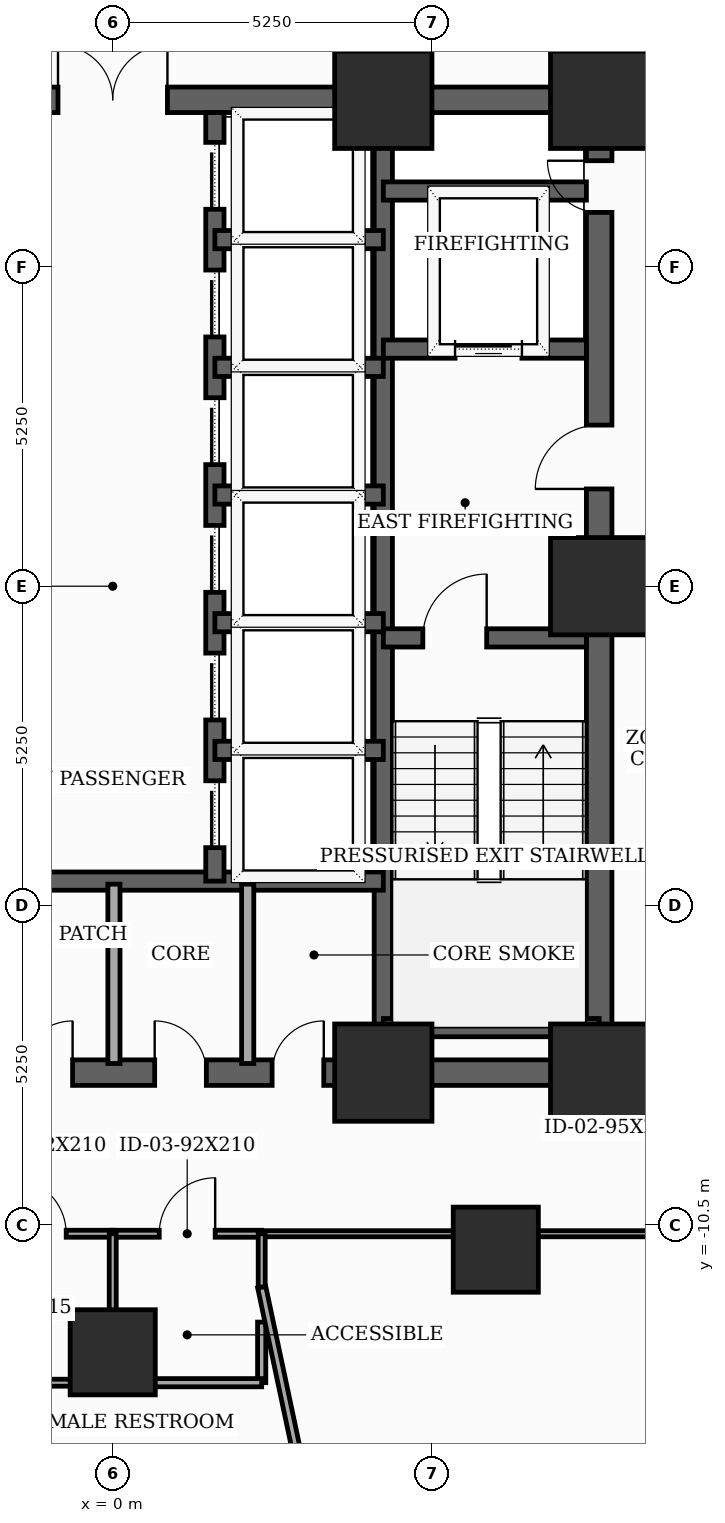
"""IFC4 building model, lengths in metres.
Left out: names, types, materials, properties, quantities, classifications, styles, units other than length and angle.
Written with IfcOpenShell. Run it as: python <this file> out.ifc"""

import sys

from ifc_helpers import new_model, si_unit, direction, frame, frame_2d, origin, origin_2d, place, context, subcontext, project, spatial, rectangle, extrude, element, fill, save


model = new_model("IFC4")
c1 = context("Model", 3, precision=1e-05, world=origin(), true_north=direction((0.0, 1.0)))
c2 = subcontext(c1, "Body", "Model", "MODEL_VIEW")
j1 = project(units=[si_unit("LENGTHUNIT", "METRE"), si_unit("PLANEANGLEUNIT", "RADIAN")], contexts=[c1])
p1 = place(None, origin())
s1 = spatial("IfcSite", under=j1, at=p1, CompositionType="ELEMENT")
p2 = place(p1, origin())
s2 = spatial("IfcBuilding", under=s1, at=p2, CompositionType="ELEMENT")
p3 = place(p2, frame((0.0, 0.0, 51.9)))
s3 = spatial("IfcBuildingStorey", under=s2, at=p3, CompositionType="ELEMENT", Elevation=51.9)
for number, where, z_axis, x_axis in (
    (1, (4.45, -8.0, 0.0), (0.0, 0.0, 1.0), (1.0, 0.0, 0.0)),
    (2, (8.0, -8.0, 0.0), (0.0, 0.0, 1.0), (1.0, 0.0, 0.0)),
    (3, (8.0, 0.0, 0.0), (0.0, 0.0, 1.0), (1.0, 0.0, 0.0)),
    (4, (8.0, 8.0, 0.0), (0.0, 0.0, 1.0), (1.0, 0.0, 0.0)),
    (5, (4.45, 8.0, 0.0), (0.0, 0.0, 1.0), (1.0, 0.0, 0.0)),
):
    element("IfcColumn", number, at=place(p3, frame(where, z_axis=z_axis, x_axis=x_axis)), inside=s3, PredefinedType="COLUMN", context=c2, shape_type="SweptSolid", body=[
        extrude(rectangle(XDim=1.6, YDim=1.6, at=origin_2d()), origin(), (0.0, 0.0, 1.0), 3.7),
    ])
for number, where, z_axis, x_axis in (
    (6, (0.0, -12.6, 0.0), (0.0, 0.0, 1.0), (1.0, 0.0, 0.0)),
    (7, (6.3, -10.912, 0.0), (0.0, 0.0, 1.0), (1.0, 0.0, 0.0)),
):
    element("IfcColumn", number, at=place(p3, frame(where, z_axis=z_axis, x_axis=x_axis)), inside=s3, PredefinedType="COLUMN", context=c2, shape_type="SweptSolid", body=[
        extrude(rectangle(XDim=1.4, YDim=1.4, at=origin_2d()), origin(), (0.0, 0.0, 1.0), 3.7),
    ])
p4 = place(p3, frame((8.0, -8.0, 0.0), z_axis=(0.0, 0.0, 1.0), x_axis=(0.0, 1.0, 0.0)))
e8 = element("IfcWall", 8, at=p4, inside=s3, PredefinedType="SHEAR", context=c2, shape_type="SweptSolid", body=[
    extrude(rectangle(XDim=16.0, YDim=0.42, at=frame_2d((8.0, 0.0))), origin(), (0.0, 0.0, 1.0), 3.5),
])
p5 = place(p4, frame((9.6, 0.0, 0.0)))
e9 = element("IfcOpeningElement", 9, at=p5, cuts=e8, PredefinedType="OPENING", context=c2, shape_type="SweptSolid", body=[
    extrude(rectangle(XDim=1.05, YDim=2.15, at=frame_2d((0.525, 1.075))), frame((0.0, 0.22, 0.0), z_axis=(0.0, -1.0, 0.0), x_axis=(1.0, 0.0, 0.0)), (0.0, 0.0, 1.0), 0.44),
])
p6 = place(p4, frame((14.148, 0.0, 0.0)))
e10 = element("IfcOpeningElement", 10, at=p6, cuts=e8, PredefinedType="OPENING", context=c2, shape_type="SweptSolid", body=[
    extrude(rectangle(XDim=0.85, YDim=2.02, at=frame_2d((0.425, 1.01))), frame((0.0, 0.22, 0.0), z_axis=(0.0, -1.0, 0.0), x_axis=(1.0, 0.0, 0.0)), (0.0, 0.0, 1.0), 0.44),
])
p7 = place(p3, frame((-8.0, -8.0, 0.0), z_axis=(0.0, 0.0, 1.0), x_axis=(1.0, 0.0, 0.0)))
e11 = element("IfcWall", 11, at=p7, inside=s3, PredefinedType="SHEAR", context=c2, shape_type="SweptSolid", body=[
    extrude(rectangle(XDim=16.0, YDim=0.42, at=frame_2d((8.0, 0.0))), origin(), (0.0, 0.0, 1.0), 3.5),
])
p8 = place(p7, frame((4.529, 0.0, 0.0)))
e12 = element("IfcOpeningElement", 12, at=p8, cuts=e11, PredefinedType="OPENING", context=c2, shape_type="SweptSolid", body=[
    extrude(rectangle(XDim=0.85, YDim=2.02, at=frame_2d((0.425, 1.01))), frame((0.0, 0.22, 0.0), z_axis=(0.0, -1.0, 0.0), x_axis=(1.0, 0.0, 0.0)), (0.0, 0.0, 1.0), 0.44),
])
p9 = place(p7, frame((6.49, 0.0, 0.0)))
e13 = element("IfcOpeningElement", 13, at=p9, cuts=e11, PredefinedType="OPENING", context=c2, shape_type="SweptSolid", body=[
    extrude(rectangle(XDim=0.85, YDim=2.02, at=frame_2d((0.425, 1.01))), frame((0.0, 0.22, 0.0), z_axis=(0.0, -1.0, 0.0), x_axis=(1.0, 0.0, 0.0)), (0.0, 0.0, 1.0), 0.44),
])
p10 = place(p7, frame((8.69, 0.0, 0.0)))
e14 = element("IfcOpeningElement", 14, at=p10, cuts=e11, PredefinedType="OPENING", context=c2, shape_type="SweptSolid", body=[
    extrude(rectangle(XDim=0.85, YDim=2.02, at=frame_2d((0.425, 1.01))), frame((0.0, 0.22, 0.0), z_axis=(0.0, -1.0, 0.0), x_axis=(1.0, 0.0, 0.0)), (0.0, 0.0, 1.0), 0.44),
])
p11 = place(p7, frame((10.621, 0.0, 0.0)))
e15 = element("IfcOpeningElement", 15, at=p11, cuts=e11, PredefinedType="OPENING", context=c2, shape_type="SweptSolid", body=[
    extrude(rectangle(XDim=0.85, YDim=2.02, at=frame_2d((0.425, 1.01))), frame((0.0, 0.22, 0.0), z_axis=(0.0, -1.0, 0.0), x_axis=(1.0, 0.0, 0.0)), (0.0, 0.0, 1.0), 0.44),
])
p12 = place(p3, frame((-8.0, 8.0, 0.0), z_axis=(0.0, 0.0, 1.0), x_axis=(1.0, 0.0, 0.0)))
e16 = element("IfcWall", 16, at=p12, inside=s3, PredefinedType="SHEAR", context=c2, shape_type="SweptSolid", body=[
    extrude(rectangle(XDim=16.0, YDim=0.42, at=frame_2d((8.0, 0.0))), origin(), (0.0, 0.0, 1.0), 3.5),
])
p13 = place(p12, frame((7.1, 0.0, 0.0)))
e17 = element("IfcOpeningElement", 17, at=p13, cuts=e16, PredefinedType="OPENING", context=c2, shape_type="SweptSolid", body=[
    extrude(rectangle(XDim=1.8, YDim=2.15, at=frame_2d((0.9, 1.075))), frame((0.0, 0.22, 0.0), z_axis=(0.0, -1.0, 0.0), x_axis=(1.0, 0.0, 0.0)), (0.0, 0.0, 1.0), 0.44),
])
p14 = place(p3, frame((4.45, -7.79, 0.0), z_axis=(0.0, 0.0, 1.0), x_axis=(0.0, 1.0, 0.0)))
e18 = element("IfcWall", 18, at=p14, inside=s3, PredefinedType="SHEAR", context=c2, shape_type="SweptSolid", body=[
    extrude(rectangle(XDim=15.58, YDim=0.3, at=frame_2d((7.79, 0.0))), origin(), (0.0, 0.0, 1.0), 3.5),
])
p15 = place(p3, frame((4.45, -0.85, 0.0), z_axis=(0.0, 0.0, 1.0), x_axis=(1.0, 0.0, 0.0)))
e19 = element("IfcWall", 19, at=p15, inside=s3, PredefinedType="SHEAR", context=c2, shape_type="SweptSolid", body=[
    extrude(rectangle(XDim=3.34, YDim=0.3, at=frame_2d((1.67, 0.0))), origin(), (0.0, 0.0, 1.0), 3.5),
])
p16 = place(p15, frame((0.65, 0.0, 0.0)))
e20 = element("IfcOpeningElement", 20, at=p16, cuts=e19, PredefinedType="OPENING", context=c2, shape_type="SweptSolid", body=[
    extrude(rectangle(XDim=1.05, YDim=2.15, at=frame_2d((0.525, 1.075))), frame((0.0, 0.16, 0.0), z_axis=(0.0, -1.0, 0.0), x_axis=(1.0, 0.0, 0.0)), (0.0, 0.0, 1.0), 0.32),
])
p17 = place(p3, frame((4.45, -7.26, 0.0), z_axis=(0.0, 0.0, 1.0), x_axis=(1.0, 0.0, 0.0)))
e21 = element("IfcWall", 21, at=p17, inside=s3, PredefinedType="SHEAR", context=c2, shape_type="SweptSolid", body=[
    extrude(rectangle(XDim=3.55, YDim=0.3, at=frame_2d((1.775, 0.0))), origin(), (0.0, 0.0, 1.0), 3.5),
])
p18 = place(p3, frame((4.45, 3.9, 0.0), z_axis=(0.0, 0.0, 1.0), x_axis=(1.0, 0.0, 0.0)))
e22 = element("IfcWall", 22, at=p18, inside=s3, PredefinedType="SHEAR", context=c2, shape_type="SweptSolid", body=[
    extrude(rectangle(XDim=3.34, YDim=0.3, at=frame_2d((1.67, 0.0))), origin(), (0.0, 0.0, 1.0), 3.5),
])
p19 = place(p18, frame((1.18, 0.0, 0.0)))
e23 = element("IfcOpeningElement", 23, at=p19, cuts=e22, PredefinedType="OPENING", context=c2, shape_type="SweptSolid", body=[
    extrude(rectangle(XDim=1.1, YDim=2.1, at=frame_2d((0.55, 1.05))), frame((0.0, 0.16, 0.0), z_axis=(0.0, -1.0, 0.0), x_axis=(1.0, 0.0, 0.0)), (0.0, 0.0, 1.0), 0.32),
])
p20 = place(p3, frame((4.45, 6.5, 0.0), z_axis=(0.0, 0.0, 1.0), x_axis=(1.0, 0.0, 0.0)))
e24 = element("IfcWall", 24, at=p20, inside=s3, PredefinedType="SHEAR", context=c2, shape_type="SweptSolid", body=[
    extrude(rectangle(XDim=3.34, YDim=0.3, at=frame_2d((1.67, 0.0))), origin(), (0.0, 0.0, 1.0), 3.5),
])
p21 = place(p3, frame((-4.45, -4.85, 0.0), z_axis=(0.0, 0.0, 1.0), x_axis=(1.0, 0.0, 0.0)))
e25 = element("IfcWall", 25, at=p21, inside=s3, PredefinedType="SHEAR", context=c2, shape_type="SweptSolid", body=[
    extrude(rectangle(XDim=8.9, YDim=0.3, at=frame_2d((4.45, 0.0))), origin(), (0.0, 0.0, 1.0), 3.5),
])
p22 = place(p3, frame((1.68, -4.85, 0.0), z_axis=(0.0, 0.0, 1.0), x_axis=(0.0, 1.0, 0.0)))
e26 = element("IfcWall", 26, at=p22, inside=s3, PredefinedType="SHEAR", context=c2, shape_type="SweptSolid", body=[
    extrude(rectangle(XDim=12.64, YDim=0.3, at=frame_2d((6.32, 0.0))), origin(), (0.0, 0.0, 1.0), 3.5),
])
p23 = place(p22, frame((0.55, 0.0, 0.0)))
e27 = element("IfcOpeningElement", 27, at=p23, cuts=e26, PredefinedType="OPENING", context=c2, shape_type="SweptSolid", body=[
    extrude(rectangle(XDim=1.1, YDim=2.1, at=frame_2d((0.55, 1.05))), frame((0.0, 0.16, 0.0), z_axis=(0.0, -1.0, 0.0), x_axis=(1.0, 0.0, 0.0)), (0.0, 0.0, 1.0), 0.32),
])
p24 = place(p22, frame((2.65, 0.0, 0.0)))
e28 = element("IfcOpeningElement", 28, at=p24, cuts=e26, PredefinedType="OPENING", context=c2, shape_type="SweptSolid", body=[
    extrude(rectangle(XDim=1.1, YDim=2.1, at=frame_2d((0.55, 1.05))), frame((0.0, 0.16, 0.0), z_axis=(0.0, -1.0, 0.0), x_axis=(1.0, 0.0, 0.0)), (0.0, 0.0, 1.0), 0.32),
])
p25 = place(p22, frame((4.75, 0.0, 0.0)))
e29 = element("IfcOpeningElement", 29, at=p25, cuts=e26, PredefinedType="OPENING", context=c2, shape_type="SweptSolid", body=[
    extrude(rectangle(XDim=1.1, YDim=2.1, at=frame_2d((0.55, 1.05))), frame((0.0, 0.16, 0.0), z_axis=(0.0, -1.0, 0.0), x_axis=(1.0, 0.0, 0.0)), (0.0, 0.0, 1.0), 0.32),
])
p26 = place(p22, frame((6.85, 0.0, 0.0)))
e30 = element("IfcOpeningElement", 30, at=p26, cuts=e26, PredefinedType="OPENING", context=c2, shape_type="SweptSolid", body=[
    extrude(rectangle(XDim=1.1, YDim=2.1, at=frame_2d((0.55, 1.05))), frame((0.0, 0.16, 0.0), z_axis=(0.0, -1.0, 0.0), x_axis=(1.0, 0.0, 0.0)), (0.0, 0.0, 1.0), 0.32),
])
p27 = place(p22, frame((8.95, 0.0, 0.0)))
e31 = element("IfcOpeningElement", 31, at=p27, cuts=e26, PredefinedType="OPENING", context=c2, shape_type="SweptSolid", body=[
    extrude(rectangle(XDim=1.1, YDim=2.1, at=frame_2d((0.55, 1.05))), frame((0.0, 0.16, 0.0), z_axis=(0.0, -1.0, 0.0), x_axis=(1.0, 0.0, 0.0)), (0.0, 0.0, 1.0), 0.32),
])
p28 = place(p22, frame((11.05, 0.0, 0.0)))
e32 = element("IfcOpeningElement", 32, at=p28, cuts=e26, PredefinedType="OPENING", context=c2, shape_type="SweptSolid", body=[
    extrude(rectangle(XDim=1.1, YDim=2.1, at=frame_2d((0.55, 1.05))), frame((0.0, 0.16, 0.0), z_axis=(0.0, -1.0, 0.0), x_axis=(1.0, 0.0, 0.0)), (0.0, 0.0, 1.0), 0.32),
])
for number, where, z_axis, x_axis in (
    (33, (1.68, 1.5, 0.0), (0.0, 0.0, 1.0), (1.0, 0.0, 0.0)),
    (34, (1.68, 3.6, 0.0), (0.0, 0.0, 1.0), (1.0, 0.0, 0.0)),
    (35, (1.68, 5.7, 0.0), (0.0, 0.0, 1.0), (1.0, 0.0, 0.0)),
    (36, (1.68, -2.7, 0.0), (0.0, 0.0, 1.0), (1.0, 0.0, 0.0)),
    (37, (1.68, -0.6, 0.0), (0.0, 0.0, 1.0), (1.0, 0.0, 0.0)),
):
    element("IfcWall", number, at=place(p3, frame(where, z_axis=z_axis, x_axis=x_axis)), inside=s3, PredefinedType="SHEAR", context=c2, shape_type="SweptSolid", body=[
        extrude(rectangle(XDim=2.77, YDim=0.3, at=frame_2d((1.385, 0.0))), origin(), (0.0, 0.0, 1.0), 3.5),
    ])
for number, where, z_axis, x_axis in (
    (38, (0.02, -7.85, 0.0), (0.0, 0.0, 1.0), (0.0, 1.0, 0.0)),
    (39, (2.22, -7.85, 0.0), (0.0, 0.0, 1.0), (0.0, 1.0, 0.0)),
):
    element("IfcWall", number, at=place(p3, frame(where, z_axis=z_axis, x_axis=x_axis)), inside=s3, PredefinedType="SOLIDWALL", context=c2, shape_type="SweptSolid", body=[
        extrude(rectangle(XDim=2.95, YDim=0.2, at=frame_2d((1.475, 0.0))), origin(), (0.0, 0.0, 1.0), 2.885),
    ])
p29 = place(p3, frame((-2.45, -10.65, 0.0), z_axis=(0.0, 0.0, 1.0), x_axis=(1.0, 0.0, 0.0)))
e40 = element("IfcWall", 40, at=p29, inside=s3, PredefinedType="PARTITIONING", context=c2, shape_type="SweptSolid", body=[
    extrude(rectangle(XDim=2.45, YDim=0.115, at=frame_2d((1.225, 0.0))), origin(), (0.0, 0.0, 1.0), 2.785),
])
p30 = place(p29, frame((0.765, 0.0, 0.0)))
e41 = element("IfcOpeningElement", 41, at=p30, cuts=e40, PredefinedType="OPENING", context=c2, shape_type="SweptSolid", body=[
    extrude(rectangle(XDim=0.92, YDim=2.1, at=frame_2d((0.46, 1.05))), frame((0.0, 0.067, 0.0), z_axis=(0.0, -1.0, 0.0), x_axis=(1.0, 0.0, 0.0)), (0.0, 0.0, 1.0), 0.135),
])
p31 = place(p3, frame((0.0, -10.65, 0.0), z_axis=(0.0, 0.0, 1.0), x_axis=(1.0, 0.0, 0.0)))
e42 = element("IfcWall", 42, at=p31, inside=s3, PredefinedType="PARTITIONING", context=c2, shape_type="SweptSolid", body=[
    extrude(rectangle(XDim=2.45, YDim=0.115, at=frame_2d((1.225, 0.0))), origin(), (0.0, 0.0, 1.0), 3.5),
])
p32 = place(p31, frame((0.765, 0.0, 0.0)))
e43 = element("IfcOpeningElement", 43, at=p32, cuts=e42, PredefinedType="OPENING", context=c2, shape_type="SweptSolid", body=[
    extrude(rectangle(XDim=0.92, YDim=2.1, at=frame_2d((0.46, 1.05))), frame((0.0, 0.067, 0.0), z_axis=(0.0, -1.0, 0.0), x_axis=(1.0, 0.0, 0.0)), (0.0, 0.0, 1.0), 0.135),
])
p33 = place(p3, frame((2.45, -10.65, 0.0), z_axis=(0.0, 0.0, 1.0), x_axis=(1.0, 0.0, 0.0)))
e44 = element("IfcWall", 44, at=p33, inside=s3, PredefinedType="MOVABLE", context=c2, shape_type="SweptSolid", body=[
    extrude(rectangle(XDim=7.139, YDim=0.1, at=frame_2d((3.57, 0.0))), origin(), (0.0, 0.0, 1.0), 2.085),
])
p34 = place(p3, frame((-2.45, -13.1, 0.0), z_axis=(0.0, 0.0, 1.0), x_axis=(1.0, 0.0, 0.0)))
e45 = element("IfcWall", 45, at=p34, inside=s3, PredefinedType="PARTITIONING", context=c2, shape_type="SweptSolid", body=[
    extrude(rectangle(XDim=2.45, YDim=0.115, at=frame_2d((1.225, 0.0))), origin(), (0.0, 0.0, 1.0), 2.085),
])
p35 = place(p3, frame((0.0, -13.1, 0.0), z_axis=(0.0, 0.0, 1.0), x_axis=(0.0, 1.0, 0.0)))
e46 = element("IfcWall", 46, at=p35, inside=s3, PredefinedType="PARTITIONING", context=c2, shape_type="SweptSolid", body=[
    extrude(rectangle(XDim=2.45, YDim=0.115, at=frame_2d((1.225, 0.0))), origin(), (0.0, 0.0, 1.0), 2.085),
])
p36 = place(p3, frame((2.45, -12.103, 0.0), z_axis=(0.0, 0.0, 1.0), x_axis=(0.0, -1.0, 0.0)))
e47 = element("IfcWall", 47, at=p36, inside=s3, PredefinedType="PARTITIONING", context=c2, shape_type="SweptSolid", body=[
    extrude(rectangle(XDim=0.997, YDim=0.135, at=frame_2d((0.499, 0.0))), origin(), (0.0, 0.0, 1.0), 2.785),
])
p37 = place(p3, frame((2.45, -13.1, 0.0), z_axis=(0.0, 0.0, 1.0), x_axis=(-1.0, 0.0, 0.0)))
e48 = element("IfcWall", 48, at=p37, inside=s3, PredefinedType="PARTITIONING", context=c2, shape_type="SweptSolid", body=[
    extrude(rectangle(XDim=2.45, YDim=0.135, at=frame_2d((1.225, 0.0))), origin(), (0.0, 0.0, 1.0), 2.085),
])
p38 = place(p3, frame((3.52, -16.56, 0.0), z_axis=(0.0, 0.0, 1.0), x_axis=(-0.20791548957, 0.978146793276, 0.0)))
e49 = element("IfcWall", 49, at=p38, inside=s3, PredefinedType="PARTITIONING", context=c2, shape_type="SweptSolid", body=[
    extrude(rectangle(XDim=5.147, YDim=0.135, at=frame_2d((2.573, 0.0))), origin(), (0.0, 0.0, 1.0), 2.785),
])
p39 = place(p3, frame((2.45, -11.526, 0.0), z_axis=(0.0, 0.0, 1.0), x_axis=(0.0, 1.0, 0.0)))
e50 = element("IfcWall", 50, at=p39, inside=s3, PredefinedType="PARTITIONING", context=c2, shape_type="SweptSolid", body=[
    extrude(rectangle(XDim=0.876, YDim=0.115, at=frame_2d((0.438, 0.0))), origin(), (0.0, 0.0, 1.0), 3.5),
])
p40 = place(p5, origin())
e51 = element("IfcDoor", 51, at=p40, inside=s3, OperationType="SINGLE_SWING_LEFT", PredefinedType="DOOR", context=c2, shape_type="SweptSolid", body=[
    extrude(rectangle(XDim=1.05, YDim=2.15, at=frame_2d((0.525, 1.075))), frame((0.0, 0.025, 0.0), z_axis=(0.0, -1.0, 0.0), x_axis=(1.0, 0.0, 0.0)), (0.0, 0.0, 1.0), 0.05),
])
fill(e9, e51)
p41 = place(p6, origin())
e52 = element("IfcDoor", 52, at=p41, inside=s3, OperationType="SINGLE_SWING_RIGHT", PredefinedType="TRAPDOOR", context=c2, shape_type="SweptSolid", body=[
    extrude(rectangle(XDim=0.85, YDim=2.02, at=frame_2d((0.425, 1.01))), frame((0.0, 0.025, 0.0), z_axis=(0.0, -1.0, 0.0), x_axis=(1.0, 0.0, 0.0)), (0.0, 0.0, 1.0), 0.05),
])
fill(e10, e52)
p42 = place(p9, origin())
e53 = element("IfcDoor", 53, at=p42, inside=s3, OperationType="SINGLE_SWING_RIGHT", PredefinedType="TRAPDOOR", context=c2, shape_type="SweptSolid", body=[
    extrude(rectangle(XDim=0.85, YDim=2.02, at=frame_2d((0.425, 1.01))), frame((0.0, 0.025, 0.0), z_axis=(0.0, -1.0, 0.0), x_axis=(1.0, 0.0, 0.0)), (0.0, 0.0, 1.0), 0.05),
])
fill(e13, e53)
p43 = place(p10, origin())
e54 = element("IfcDoor", 54, at=p43, inside=s3, OperationType="SINGLE_SWING_LEFT", PredefinedType="TRAPDOOR", context=c2, shape_type="SweptSolid", body=[
    extrude(rectangle(XDim=0.85, YDim=2.02, at=frame_2d((0.425, 1.01))), frame((0.0, 0.025, 0.0), z_axis=(0.0, -1.0, 0.0), x_axis=(1.0, 0.0, 0.0)), (0.0, 0.0, 1.0), 0.05),
])
fill(e14, e54)
p44 = place(p11, origin())
e55 = element("IfcDoor", 55, at=p44, inside=s3, OperationType="SINGLE_SWING_RIGHT", PredefinedType="TRAPDOOR", context=c2, shape_type="SweptSolid", body=[
    extrude(rectangle(XDim=0.85, YDim=2.02, at=frame_2d((0.425, 1.01))), frame((0.0, 0.025, 0.0), z_axis=(0.0, -1.0, 0.0), x_axis=(1.0, 0.0, 0.0)), (0.0, 0.0, 1.0), 0.05),
])
fill(e15, e55)
p45 = place(p13, origin())
e56 = element("IfcDoor", 56, at=p45, inside=s3, OperationType="DOUBLE_DOOR_SINGLE_SWING", PredefinedType="DOOR", context=c2, shape_type="SweptSolid", body=[
    extrude(rectangle(XDim=1.8, YDim=2.15, at=frame_2d((0.9, 1.075))), frame((0.0, 0.025, 0.0), z_axis=(0.0, -1.0, 0.0), x_axis=(1.0, 0.0, 0.0)), (0.0, 0.0, 1.0), 0.05),
])
fill(e17, e56)
p46 = place(p16, origin())
e57 = element("IfcDoor", 57, at=p46, inside=s3, OperationType="SINGLE_SWING_RIGHT", PredefinedType="DOOR", context=c2, shape_type="SweptSolid", body=[
    extrude(rectangle(XDim=1.05, YDim=2.15, at=frame_2d((0.525, 1.075))), frame((0.0, 0.025, 0.0), z_axis=(0.0, -1.0, 0.0), x_axis=(1.0, 0.0, 0.0)), (0.0, 0.0, 1.0), 0.05),
])
fill(e20, e57)
p47 = place(p19, origin())
e58 = element("IfcDoor", 58, at=p47, inside=s3, OperationType="SLIDING_TO_LEFT", PredefinedType="DOOR", context=c2, shape_type="SweptSolid", body=[
    extrude(rectangle(XDim=1.1, YDim=2.1, at=frame_2d((0.55, 1.05))), frame((0.0, 0.025, 0.0), z_axis=(0.0, -1.0, 0.0), x_axis=(1.0, 0.0, 0.0)), (0.0, 0.0, 1.0), 0.05),
])
fill(e23, e58)
p48 = place(p23, origin())
e59 = element("IfcDoor", 59, at=p48, inside=s3, OperationType="SLIDING_TO_LEFT", PredefinedType="DOOR", context=c2, shape_type="SweptSolid", body=[
    extrude(rectangle(XDim=1.1, YDim=2.1, at=frame_2d((0.55, 1.05))), frame((0.0, 0.025, 0.0), z_axis=(0.0, -1.0, 0.0), x_axis=(1.0, 0.0, 0.0)), (0.0, 0.0, 1.0), 0.05),
])
fill(e27, e59)
p49 = place(p24, origin())
e60 = element("IfcDoor", 60, at=p49, inside=s3, OperationType="SLIDING_TO_LEFT", PredefinedType="DOOR", context=c2, shape_type="SweptSolid", body=[
    extrude(rectangle(XDim=1.1, YDim=2.1, at=frame_2d((0.55, 1.05))), frame((0.0, 0.025, 0.0), z_axis=(0.0, -1.0, 0.0), x_axis=(1.0, 0.0, 0.0)), (0.0, 0.0, 1.0), 0.05),
])
fill(e28, e60)
p50 = place(p25, origin())
e61 = element("IfcDoor", 61, at=p50, inside=s3, OperationType="SLIDING_TO_LEFT", PredefinedType="DOOR", context=c2, shape_type="SweptSolid", body=[
    extrude(rectangle(XDim=1.1, YDim=2.1, at=frame_2d((0.55, 1.05))), frame((0.0, 0.025, 0.0), z_axis=(0.0, -1.0, 0.0), x_axis=(1.0, 0.0, 0.0)), (0.0, 0.0, 1.0), 0.05),
])
fill(e29, e61)
p51 = place(p26, origin())
e62 = element("IfcDoor", 62, at=p51, inside=s3, OperationType="SLIDING_TO_LEFT", PredefinedType="DOOR", context=c2, shape_type="SweptSolid", body=[
    extrude(rectangle(XDim=1.1, YDim=2.1, at=frame_2d((0.55, 1.05))), frame((0.0, 0.025, 0.0), z_axis=(0.0, -1.0, 0.0), x_axis=(1.0, 0.0, 0.0)), (0.0, 0.0, 1.0), 0.05),
])
fill(e30, e62)
p52 = place(p27, origin())
e63 = element("IfcDoor", 63, at=p52, inside=s3, OperationType="SLIDING_TO_LEFT", PredefinedType="DOOR", context=c2, shape_type="SweptSolid", body=[
    extrude(rectangle(XDim=1.1, YDim=2.1, at=frame_2d((0.55, 1.05))), frame((0.0, 0.025, 0.0), z_axis=(0.0, -1.0, 0.0), x_axis=(1.0, 0.0, 0.0)), (0.0, 0.0, 1.0), 0.05),
])
fill(e31, e63)
p53 = place(p28, origin())
e64 = element("IfcDoor", 64, at=p53, inside=s3, OperationType="SLIDING_TO_LEFT", PredefinedType="DOOR", context=c2, shape_type="SweptSolid", body=[
    extrude(rectangle(XDim=1.1, YDim=2.1, at=frame_2d((0.55, 1.05))), frame((0.0, 0.025, 0.0), z_axis=(0.0, -1.0, 0.0), x_axis=(1.0, 0.0, 0.0)), (0.0, 0.0, 1.0), 0.05),
])
fill(e32, e64)
p54 = place(p30, origin())
e65 = element("IfcDoor", 65, at=p54, inside=s3, OperationType="SINGLE_SWING_LEFT", PredefinedType="DOOR", context=c2, shape_type="SweptSolid", body=[
    extrude(rectangle(XDim=0.92, YDim=2.1, at=frame_2d((0.46, 1.05))), frame((0.0, 0.025, 0.0), z_axis=(0.0, -1.0, 0.0), x_axis=(1.0, 0.0, 0.0)), (0.0, 0.0, 1.0), 0.05),
])
fill(e41, e65)
p55 = place(p32, origin())
e66 = element("IfcDoor", 66, at=p55, inside=s3, OperationType="SINGLE_SWING_RIGHT", PredefinedType="DOOR", context=c2, shape_type="SweptSolid", body=[
    extrude(rectangle(XDim=0.92, YDim=2.1, at=frame_2d((0.46, 1.05))), frame((0.0, 0.025, 0.0), z_axis=(0.0, -1.0, 0.0), x_axis=(1.0, 0.0, 0.0)), (0.0, 0.0, 1.0), 0.05),
])
fill(e43, e66)
save(model, sys.argv[1])
